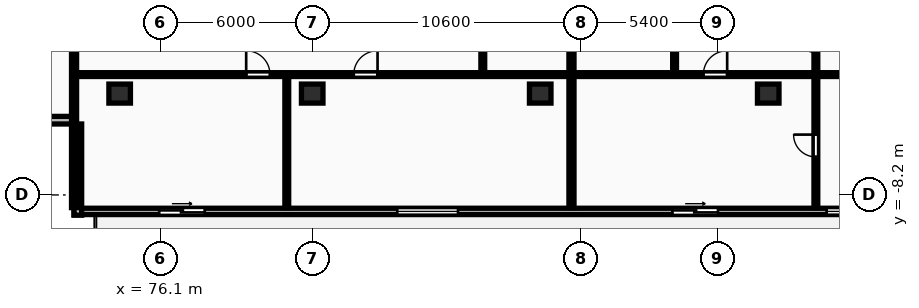
"""IFC4 building model, lengths in metres.
Left out: names, types, materials, properties, quantities, classifications, styles, units other than length and angle.
Written with IfcOpenShell. Run it as: python <this file> out.ifc"""

import sys

from ifc_helpers import new_model, si_unit, direction, frame, frame_2d, origin, origin_2d, place, context, subcontext, project, spatial, rectangle, extrude, element, fill, save


model = new_model("IFC4")
c1 = context("Model", 3, precision=1e-05, world=origin(), true_north=direction((0.0, 1.0)))
c2 = subcontext(c1, "Body", "Model", "MODEL_VIEW")
j1 = project(units=[si_unit("LENGTHUNIT", "METRE"), si_unit("PLANEANGLEUNIT", "RADIAN")], contexts=[c1])
p1 = place(None, origin())
s1 = spatial("IfcSite", under=j1, at=p1, CompositionType="ELEMENT")
p2 = place(p1, origin())
s2 = spatial("IfcBuilding", under=s1, at=p2, CompositionType="ELEMENT")
p3 = place(p2, frame((0.0, 0.0, 113.3)))
s3 = spatial("IfcBuildingStorey", under=s2, at=p3, CompositionType="ELEMENT", Elevation=113.3)
for number, where, z_axis, x_axis in (
    (1, (74.5, -4.2, 0.0), (0.0, 0.0, 1.0), (1.0, 0.0, 0.0)),
    (2, (82.1, -4.2, 0.0), (0.0, 0.0, 1.0), (1.0, 0.0, 0.0)),
    (3, (91.1, -4.2, 0.0), (0.0, 0.0, 1.0), (1.0, 0.0, 0.0)),
    (4, (100.1, -4.2, 0.0), (0.0, 0.0, 1.0), (1.0, 0.0, 0.0)),
):
    element("IfcColumn", number, at=place(p3, frame(where, z_axis=z_axis, x_axis=x_axis)), inside=s3, PredefinedType="COLUMN", context=c2, shape_type="SweptSolid", body=[
        extrude(rectangle(XDim=0.85, YDim=0.75, at=origin_2d()), origin(), (0.0, 0.0, 1.0), 3.25),
    ])
p4 = place(p3, frame((72.7, -8.85, 0.0), z_axis=(0.0, 0.0, 1.0), x_axis=(1.0, 0.0, 0.0)))
e5 = element("IfcWall", 5, at=p4, inside=s3, PredefinedType="STANDARD", context=c2, shape_type="SweptSolid", body=[
    extrude(rectangle(XDim=58.0, YDim=0.25, at=frame_2d((29.0, 0.0))), origin(), (0.0, 0.0, 1.0), 2.97),
])
p5 = place(p4, frame((3.358, 0.0, 0.0)))
e6 = element("IfcOpeningElement", 6, at=p5, cuts=e5, PredefinedType="OPENING", context=c2, shape_type="SweptSolid", body=[
    extrude(rectangle(XDim=1.8, YDim=2.2, at=frame_2d((0.9, 1.1))), frame((0.0, 0.135, 0.0), z_axis=(0.0, -1.0, 0.0), x_axis=(1.0, 0.0, 0.0)), (0.0, 0.0, 1.0), 0.27),
])
p6 = place(p4, frame((12.755, 0.0, 0.85)))
e7 = element("IfcOpeningElement", 7, at=p6, cuts=e5, PredefinedType="OPENING", context=c2, shape_type="SweptSolid", body=[
    extrude(rectangle(XDim=2.4, YDim=1.9, at=frame_2d((1.2, 0.95))), frame((0.0, 0.135, 0.0), z_axis=(0.0, -1.0, 0.0), x_axis=(1.0, 0.0, 0.0)), (0.0, 0.0, 1.0), 0.27),
])
p7 = place(p4, frame((23.617, 0.0, 0.0)))
e8 = element("IfcOpeningElement", 8, at=p7, cuts=e5, PredefinedType="OPENING", context=c2, shape_type="SweptSolid", body=[
    extrude(rectangle(XDim=1.8, YDim=2.2, at=frame_2d((0.9, 1.1))), frame((0.0, 0.135, 0.0), z_axis=(0.0, -1.0, 0.0), x_axis=(1.0, 0.0, 0.0)), (0.0, 0.0, 1.0), 0.27),
])
p8 = place(p4, frame((29.705, 0.0, 0.85)))
e9 = element("IfcOpeningElement", 9, at=p8, cuts=e5, PredefinedType="OPENING", context=c2, shape_type="SweptSolid", body=[
    extrude(rectangle(XDim=1.8, YDim=1.8, at=frame_2d((0.9, 0.9))), frame((0.0, 0.135, 0.0), z_axis=(0.0, -1.0, 0.0), x_axis=(1.0, 0.0, 0.0)), (0.0, 0.0, 1.0), 0.27),
])
p9 = place(p4, frame((36.417, 0.0, 0.0)))
e10 = element("IfcOpeningElement", 10, at=p9, cuts=e5, PredefinedType="OPENING", context=c2, shape_type="SweptSolid", body=[
    extrude(rectangle(XDim=1.8, YDim=2.2, at=frame_2d((0.9, 1.1))), frame((0.0, 0.135, 0.0), z_axis=(0.0, -1.0, 0.0), x_axis=(1.0, 0.0, 0.0)), (0.0, 0.0, 1.0), 0.27),
])
p10 = place(p4, frame((43.213, 0.0, 0.85)))
e11 = element("IfcOpeningElement", 11, at=p10, cuts=e5, PredefinedType="OPENING", context=c2, shape_type="SweptSolid", body=[
    extrude(rectangle(XDim=1.8, YDim=1.8, at=frame_2d((0.9, 0.9))), frame((0.0, 0.135, 0.0), z_axis=(0.0, -1.0, 0.0), x_axis=(1.0, 0.0, 0.0)), (0.0, 0.0, 1.0), 0.27),
])
p11 = place(p4, frame((49.262, 0.0, 0.0)))
e12 = element("IfcOpeningElement", 12, at=p11, cuts=e5, PredefinedType="OPENING", context=c2, shape_type="SweptSolid", body=[
    extrude(rectangle(XDim=1.8, YDim=2.2, at=frame_2d((0.9, 1.1))), frame((0.0, 0.135, 0.0), z_axis=(0.0, -1.0, 0.0), x_axis=(1.0, 0.0, 0.0)), (0.0, 0.0, 1.0), 0.27),
])
p12 = place(p4, frame((54.9, 0.0, 0.85)))
e13 = element("IfcOpeningElement", 13, at=p12, cuts=e5, PredefinedType="OPENING", context=c2, shape_type="SweptSolid", body=[
    extrude(rectangle(XDim=2.4, YDim=1.9, at=frame_2d((1.2, 0.95))), frame((0.0, 0.135, 0.0), z_axis=(0.0, -1.0, 0.0), x_axis=(1.0, 0.0, 0.0)), (0.0, 0.0, 1.0), 0.27),
])
p13 = place(p3, frame((69.1, -5.25, 0.0), z_axis=(0.0, 0.0, 1.0), x_axis=(1.0, 0.0, 0.0)))
e14 = element("IfcWall", 14, at=p13, inside=s3, PredefinedType="STANDARD", context=c2, shape_type="SweptSolid", body=[
    extrude(rectangle(XDim=3.6, YDim=0.3, at=frame_2d((1.8, 0.0))), origin(), (0.0, 0.0, 1.0), 2.97),
])
p14 = place(p3, frame((72.85, -5.4, 0.0), z_axis=(0.0, 0.0, 1.0), x_axis=(0.0, -1.0, 0.0)))
e15 = element("IfcWall", 15, at=p14, inside=s3, PredefinedType="STANDARD", context=c2, shape_type="SweptSolid", body=[
    extrude(rectangle(XDim=3.6, YDim=0.3, at=frame_2d((1.8, 0.0))), origin(), (0.0, 0.0, 1.0), 2.97),
])
for number, where, z_axis, x_axis in (
    (16, (72.7, -8.7, 0.0), (0.0, 0.0, 1.0), (0.0, 1.0, 0.0)),
    (17, (92.333, -8.7, 0.0), (0.0, 0.0, 1.0), (0.0, 1.0, 0.0)),
):
    element("IfcWall", number, at=place(p3, frame(where, z_axis=z_axis, x_axis=x_axis)), inside=s3, PredefinedType="PARTITIONING", context=c2, shape_type="SweptSolid", body=[
        extrude(rectangle(XDim=24.57, YDim=0.2, at=frame_2d((12.285, 0.0))), origin(), (0.0, 0.0, 1.0), 2.97),
    ])
p15 = place(p3, frame((88.833, -3.39, 0.0), z_axis=(0.0, 0.0, 1.0), x_axis=(0.0, 1.0, 0.0)))
e18 = element("IfcWall", 18, at=p15, inside=s3, PredefinedType="PARTITIONING", context=c2, shape_type="SweptSolid", body=[
    extrude(rectangle(XDim=19.28, YDim=0.15, at=frame_2d((9.64, 0.0))), origin(), (0.0, 0.0, 1.0), 2.97),
])
p16 = place(p15, frame((2.406, 0.0, 0.0)))
e19 = element("IfcOpeningElement", 19, at=p16, cuts=e18, PredefinedType="OPENING", context=c2, shape_type="SweptSolid", body=[
    extrude(rectangle(XDim=0.96, YDim=2.1, at=frame_2d((0.48, 1.05))), frame((0.0, 0.085, 0.0), z_axis=(0.0, -1.0, 0.0), x_axis=(1.0, 0.0, 0.0)), (0.0, 0.0, 1.0), 0.17),
])
p17 = place(p15, frame((6.133, 0.0, 0.0)))
e20 = element("IfcOpeningElement", 20, at=p17, cuts=e18, PredefinedType="OPENING", context=c2, shape_type="SweptSolid", body=[
    extrude(rectangle(XDim=0.88, YDim=2.06, at=frame_2d((0.44, 1.03))), frame((0.0, 0.085, 0.0), z_axis=(0.0, -1.0, 0.0), x_axis=(1.0, 0.0, 0.0)), (0.0, 0.0, 1.0), 0.17),
])
p18 = place(p15, frame((7.674, 0.0, 0.0)))
e21 = element("IfcOpeningElement", 21, at=p18, cuts=e18, PredefinedType="OPENING", context=c2, shape_type="SweptSolid", body=[
    extrude(rectangle(XDim=0.84, YDim=2.04, at=frame_2d((0.42, 1.02))), frame((0.0, 0.085, 0.0), z_axis=(0.0, -1.0, 0.0), x_axis=(1.0, 0.0, 0.0)), (0.0, 0.0, 1.0), 0.17),
])
p19 = place(p3, frame((81.097, -8.7, 0.0), z_axis=(0.0, 0.0, 1.0), x_axis=(0.0, 1.0, 0.0)))
e22 = element("IfcWall", 22, at=p19, inside=s3, PredefinedType="PARTITIONING", context=c2, shape_type="SweptSolid", body=[
    extrude(rectangle(XDim=5.17, YDim=0.15, at=frame_2d((2.585, 0.0))), origin(), (0.0, 0.0, 1.0), 2.97),
])
p20 = place(p3, frame((72.78, -3.45, 0.0), z_axis=(0.0, 0.0, 1.0), x_axis=(1.0, 0.0, 0.0)))
e23 = element("IfcWall", 23, at=p20, inside=s3, PredefinedType="PARTITIONING", context=c2, shape_type="SweptSolid", body=[
    extrude(rectangle(XDim=19.473, YDim=0.15, at=frame_2d((9.737, 0.0))), origin(), (0.0, 0.0, 1.0), 2.97),
])
p21 = place(p20, frame((6.714, 0.0, 0.0)))
e24 = element("IfcOpeningElement", 24, at=p21, cuts=e23, PredefinedType="OPENING", context=c2, shape_type="SweptSolid", body=[
    extrude(rectangle(XDim=0.94, YDim=2.1, at=frame_2d((0.47, 1.05))), frame((0.0, 0.085, 0.0), z_axis=(0.0, -1.0, 0.0), x_axis=(1.0, 0.0, 0.0)), (0.0, 0.0, 1.0), 0.17),
])
p22 = place(p20, frame((10.959, 0.0, 0.0)))
e25 = element("IfcOpeningElement", 25, at=p22, cuts=e23, PredefinedType="OPENING", context=c2, shape_type="SweptSolid", body=[
    extrude(rectangle(XDim=0.94, YDim=2.1, at=frame_2d((0.47, 1.05))), frame((0.0, 0.085, 0.0), z_axis=(0.0, -1.0, 0.0), x_axis=(1.0, 0.0, 0.0)), (0.0, 0.0, 1.0), 0.17),
])
p23 = place(p3, frame((96.403, -3.39, 0.0), z_axis=(0.0, 0.0, 1.0), x_axis=(0.0, 1.0, 0.0)))
e26 = element("IfcWall", 26, at=p23, inside=s3, PredefinedType="PARTITIONING", context=c2, shape_type="SweptSolid", body=[
    extrude(rectangle(XDim=5.0, YDim=0.15, at=frame_2d((2.5, 0.0))), origin(), (0.0, 0.0, 1.0), 2.97),
])
p24 = place(p23, frame((2.06, 0.0, 0.0)))
e27 = element("IfcOpeningElement", 27, at=p24, cuts=e26, PredefinedType="OPENING", context=c2, shape_type="SweptSolid", body=[
    extrude(rectangle(XDim=0.88, YDim=2.06, at=frame_2d((0.44, 1.03))), frame((0.0, 0.085, 0.0), z_axis=(0.0, -1.0, 0.0), x_axis=(1.0, 0.0, 0.0)), (0.0, 0.0, 1.0), 0.17),
])
p25 = place(p3, frame((101.98, -8.7, 0.0), z_axis=(0.0, 0.0, 1.0), x_axis=(0.0, 1.0, 0.0)))
e28 = element("IfcWall", 28, at=p25, inside=s3, PredefinedType="PARTITIONING", context=c2, shape_type="SweptSolid", body=[
    extrude(rectangle(XDim=10.31, YDim=0.15, at=frame_2d((5.155, 0.0))), origin(), (0.0, 0.0, 1.0), 2.97),
])
p26 = place(p25, frame((6.12, 0.0, 0.0)))
e29 = element("IfcOpeningElement", 29, at=p26, cuts=e28, PredefinedType="OPENING", context=c2, shape_type="SweptSolid", body=[
    extrude(rectangle(XDim=0.84, YDim=2.04, at=frame_2d((0.42, 1.02))), frame((0.0, 0.085, 0.0), z_axis=(0.0, -1.0, 0.0), x_axis=(1.0, 0.0, 0.0)), (0.0, 0.0, 1.0), 0.17),
])
p27 = place(p25, frame((8.04, 0.0, 0.0)))
e30 = element("IfcOpeningElement", 30, at=p27, cuts=e28, PredefinedType="OPENING", context=c2, shape_type="SweptSolid", body=[
    extrude(rectangle(XDim=0.84, YDim=2.04, at=frame_2d((0.42, 1.02))), frame((0.0, 0.085, 0.0), z_axis=(0.0, -1.0, 0.0), x_axis=(1.0, 0.0, 0.0)), (0.0, 0.0, 1.0), 0.17),
])
p28 = place(p25, frame((2.001, 0.0, 0.0)))
e31 = element("IfcOpeningElement", 31, at=p28, cuts=e28, PredefinedType="OPENING", context=c2, shape_type="SweptSolid", body=[
    extrude(rectangle(XDim=0.88, YDim=2.06, at=frame_2d((0.44, 1.03))), frame((0.0, 0.085, 0.0), z_axis=(0.0, -1.0, 0.0), x_axis=(1.0, 0.0, 0.0)), (0.0, 0.0, 1.0), 0.17),
])
p29 = place(p3, frame((92.413, -3.45, 0.0), z_axis=(0.0, 0.0, 1.0), x_axis=(1.0, 0.0, 0.0)))
e32 = element("IfcWall", 32, at=p29, inside=s3, PredefinedType="PARTITIONING", context=c2, shape_type="SweptSolid", body=[
    extrude(rectangle(XDim=12.257, YDim=0.15, at=frame_2d((6.128, 0.0))), origin(), (0.0, 0.0, 1.0), 2.97),
])
p30 = place(p29, frame((5.126, 0.0, 0.0)))
e33 = element("IfcOpeningElement", 33, at=p30, cuts=e32, PredefinedType="OPENING", context=c2, shape_type="SweptSolid", body=[
    extrude(rectangle(XDim=0.94, YDim=2.1, at=frame_2d((0.47, 1.05))), frame((0.0, 0.085, 0.0), z_axis=(0.0, -1.0, 0.0), x_axis=(1.0, 0.0, 0.0)), (0.0, 0.0, 1.0), 0.17),
])
p31 = place(p5, origin())
e34 = element("IfcDoor", 34, at=p31, inside=s3, OperationType="SLIDING_TO_RIGHT", PredefinedType="DOOR", context=c2, shape_type="SweptSolid", body=[
    extrude(rectangle(XDim=1.8, YDim=2.2, at=frame_2d((0.9, 1.1))), frame((0.0, 0.025, 0.0), z_axis=(0.0, -1.0, 0.0), x_axis=(1.0, 0.0, 0.0)), (0.0, 0.0, 1.0), 0.05),
])
fill(e6, e34)
p32 = place(p6, origin())
e35 = element("IfcWindow", 35, at=p32, inside=s3, PartitioningType="DOUBLE_PANEL_VERTICAL", PredefinedType="WINDOW", context=c2, shape_type="SweptSolid", body=[
    extrude(rectangle(XDim=2.4, YDim=1.9, at=frame_2d((1.2, 0.95))), frame((0.0, 0.03, 0.0), z_axis=(0.0, -1.0, 0.0), x_axis=(1.0, 0.0, 0.0)), (0.0, 0.0, 1.0), 0.06),
])
fill(e7, e35)
p33 = place(p7, origin())
e36 = element("IfcDoor", 36, at=p33, inside=s3, OperationType="SLIDING_TO_RIGHT", PredefinedType="DOOR", context=c2, shape_type="SweptSolid", body=[
    extrude(rectangle(XDim=1.8, YDim=2.2, at=frame_2d((0.9, 1.1))), frame((0.0, 0.025, 0.0), z_axis=(0.0, -1.0, 0.0), x_axis=(1.0, 0.0, 0.0)), (0.0, 0.0, 1.0), 0.05),
])
fill(e8, e36)
p34 = place(p8, origin())
e37 = element("IfcWindow", 37, at=p34, inside=s3, PartitioningType="SINGLE_PANEL", PredefinedType="WINDOW", context=c2, shape_type="SweptSolid", body=[
    extrude(rectangle(XDim=1.8, YDim=1.8, at=frame_2d((0.9, 0.9))), frame((0.0, 0.03, 0.0), z_axis=(0.0, -1.0, 0.0), x_axis=(1.0, 0.0, 0.0)), (0.0, 0.0, 1.0), 0.06),
])
fill(e9, e37)
p35 = place(p21, origin())
e38 = element("IfcDoor", 38, at=p35, inside=s3, OperationType="SINGLE_SWING_LEFT", PredefinedType="DOOR", context=c2, shape_type="SweptSolid", body=[
    extrude(rectangle(XDim=0.94, YDim=2.1, at=frame_2d((0.47, 1.05))), frame((0.0, 0.025, 0.0), z_axis=(0.0, -1.0, 0.0), x_axis=(1.0, 0.0, 0.0)), (0.0, 0.0, 1.0), 0.05),
])
fill(e24, e38)
p36 = place(p22, origin())
e39 = element("IfcDoor", 39, at=p36, inside=s3, OperationType="SINGLE_SWING_RIGHT", PredefinedType="DOOR", context=c2, shape_type="SweptSolid", body=[
    extrude(rectangle(XDim=0.94, YDim=2.1, at=frame_2d((0.47, 1.05))), frame((0.0, 0.025, 0.0), z_axis=(0.0, -1.0, 0.0), x_axis=(1.0, 0.0, 0.0)), (0.0, 0.0, 1.0), 0.05),
])
fill(e25, e39)
p37 = place(p26, origin())
e40 = element("IfcDoor", 40, at=p37, inside=s3, OperationType="SINGLE_SWING_RIGHT", PredefinedType="DOOR", context=c2, shape_type="SweptSolid", body=[
    extrude(rectangle(XDim=0.84, YDim=2.04, at=frame_2d((0.42, 1.02))), frame((0.0, 0.025, 0.0), z_axis=(0.0, -1.0, 0.0), x_axis=(1.0, 0.0, 0.0)), (0.0, 0.0, 1.0), 0.05),
])
fill(e29, e40)
p38 = place(p28, origin())
e41 = element("IfcDoor", 41, at=p38, inside=s3, OperationType="SINGLE_SWING_RIGHT", PredefinedType="DOOR", context=c2, shape_type="SweptSolid", body=[
    extrude(rectangle(XDim=0.88, YDim=2.06, at=frame_2d((0.44, 1.03))), frame((0.0, 0.025, 0.0), z_axis=(0.0, -1.0, 0.0), x_axis=(1.0, 0.0, 0.0)), (0.0, 0.0, 1.0), 0.05),
])
fill(e31, e41)
p39 = place(p30, origin())
e42 = element("IfcDoor", 42, at=p39, inside=s3, OperationType="SINGLE_SWING_RIGHT", PredefinedType="DOOR", context=c2, shape_type="SweptSolid", body=[
    extrude(rectangle(XDim=0.94, YDim=2.1, at=frame_2d((0.47, 1.05))), frame((0.0, 0.025, 0.0), z_axis=(0.0, -1.0, 0.0), x_axis=(1.0, 0.0, 0.0)), (0.0, 0.0, 1.0), 0.05),
])
fill(e33, e42)
save(model, sys.argv[1])
